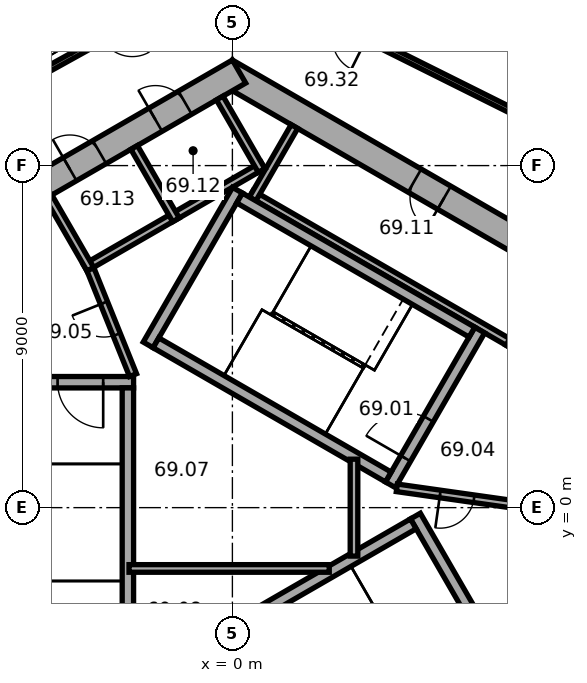
"""IFC4 building model, lengths in metres.
Left out: names, types, materials, properties, quantities, classifications, styles, units other than length and angle.
Written with IfcOpenShell. Run it as: python <this file> out.ifc"""

import sys

from ifc_helpers import new_model, si_unit, direction, frame, frame_2d, origin, place, context, subcontext, project, spatial, rectangle, extrude, element, fill, save


model = new_model("IFC4")
c1 = context("Model", 3, precision=1e-05, world=origin(), true_north=direction((0.0, 1.0)))
c2 = subcontext(c1, "Body", "Model", "MODEL_VIEW")
j1 = project(units=[si_unit("LENGTHUNIT", "METRE"), si_unit("PLANEANGLEUNIT", "RADIAN")], contexts=[c1])
p1 = place(None, origin())
s1 = spatial("IfcSite", under=j1, at=p1, CompositionType="ELEMENT")
p2 = place(p1, origin())
s2 = spatial("IfcBuilding", under=s1, at=p2, CompositionType="ELEMENT")
p3 = place(p2, frame((0.0, 0.0, 278.3)))
s3 = spatial("IfcBuildingStorey", under=s2, at=p3, CompositionType="ELEMENT", Elevation=278.3)
p4 = place(p3, frame((10.025, 5.586, 0.0), z_axis=(0.0, 0.0, 1.0), x_axis=(-0.866026453023, 0.499998182661, 0.0)))
e1 = element("IfcWall", 1, at=p4, inside=s3, PredefinedType="SHEAR", context=c2, shape_type="SweptSolid", body=[
    extrude(rectangle(XDim=11.778, YDim=0.7, at=frame_2d((5.889, 0.0))), origin(), (0.0, 0.0, 1.0), 7.4),
])
p5 = place(p4, frame((5.139, 0.0, 0.0)))
e2 = element("IfcOpeningElement", 2, at=p5, cuts=e1, PredefinedType="OPENING", context=c2, shape_type="SweptSolid", body=[
    extrude(rectangle(XDim=0.9, YDim=2.1, at=frame_2d((0.45, 1.05))), frame((0.0, 0.36, 0.0), z_axis=(0.0, -1.0, 0.0), x_axis=(1.0, 0.0, 0.0)), (0.0, 0.0, 1.0), 0.72),
])
p6 = place(p3, frame((0.175, 11.475, 0.0), z_axis=(0.0, 0.0, 1.0), x_axis=(-0.866026453023, -0.499998182661, 0.0)))
e3 = element("IfcWall", 3, at=p6, inside=s3, PredefinedType="SHEAR", context=c2, shape_type="SweptSolid", body=[
    extrude(rectangle(XDim=11.778, YDim=0.7, at=frame_2d((5.889, 0.0))), origin(), (0.0, 0.0, 1.0), 7.4),
])
p7 = place(p6, frame((6.089, 0.0, 0.0)))
e4 = element("IfcOpeningElement", 4, at=p7, cuts=e3, PredefinedType="OPENING", context=c2, shape_type="SweptSolid", body=[
    extrude(rectangle(XDim=1.5, YDim=2.1, at=frame_2d((0.75, 1.05))), frame((0.0, 0.36, 0.0), z_axis=(0.0, -1.0, 0.0), x_axis=(1.0, 0.0, 0.0)), (0.0, 0.0, 1.0), 0.72),
])
p8 = place(p6, frame((1.639, 0.0, 0.0)))
e5 = element("IfcOpeningElement", 5, at=p8, cuts=e3, PredefinedType="OPENING", context=c2, shape_type="SweptSolid", body=[
    extrude(rectangle(XDim=0.9, YDim=2.1, at=frame_2d((0.45, 1.05))), frame((0.0, 0.36, 0.0), z_axis=(0.0, -1.0, 0.0), x_axis=(1.0, 0.0, 0.0)), (0.0, 0.0, 1.0), 0.72),
])
p9 = place(p6, frame((4.239, 0.0, 0.0)))
e6 = element("IfcOpeningElement", 6, at=p9, cuts=e3, PredefinedType="OPENING", context=c2, shape_type="SweptSolid", body=[
    extrude(rectangle(XDim=0.9, YDim=2.1, at=frame_2d((0.45, 1.05))), frame((0.0, 0.36, 0.0), z_axis=(0.0, -1.0, 0.0), x_axis=(1.0, 0.0, 0.0)), (0.0, 0.0, 1.0), 0.72),
])
p10 = place(p3, frame((-13.117, 6.958, 0.0), z_axis=(0.0, 0.0, 1.0), x_axis=(0.874660896688, 0.484735304889, 0.0)))
e7 = element("IfcWall", 7, at=p10, inside=s3, PredefinedType="STANDARD", context=c2, shape_type="SweptSolid", body=[
    extrude(rectangle(XDim=14.781, YDim=0.15, at=frame_2d((7.39, 0.0))), origin(), (0.0, 0.0, 1.0), 2.6),
])
p11 = place(p10, frame((2.795, 0.0, 0.0)))
e8 = element("IfcOpeningElement", 8, at=p11, cuts=e7, PredefinedType="OPENING", context=c2, shape_type="SweptSolid", body=[
    extrude(rectangle(XDim=1.8, YDim=2.4, at=frame_2d((0.9, 1.2))), frame((0.0, 0.085, 0.0), z_axis=(0.0, -1.0, 0.0), x_axis=(1.0, 0.0, 0.0)), (0.0, 0.0, 1.0), 0.17),
])
p12 = place(p10, frame((10.186, 0.0, 0.0)))
e9 = element("IfcOpeningElement", 9, at=p12, cuts=e7, PredefinedType="OPENING", context=c2, shape_type="SweptSolid", body=[
    extrude(rectangle(XDim=1.8, YDim=2.4, at=frame_2d((0.9, 1.2))), frame((0.0, 0.085, 0.0), z_axis=(0.0, -1.0, 0.0), x_axis=(1.0, 0.0, 0.0)), (0.0, 0.0, 1.0), 0.17),
])
p13 = place(p3, frame((-0.149, 14.181, 0.0), z_axis=(0.0, 0.0, 1.0), x_axis=(0.894939310063, -0.446187887894, 0.0)))
e10 = element("IfcWall", 10, at=p13, inside=s3, PredefinedType="STANDARD", context=c2, shape_type="SweptSolid", body=[
    extrude(rectangle(XDim=12.857, YDim=0.15, at=frame_2d((6.428, 0.0))), origin(), (0.0, 0.0, 1.0), 2.6),
])
p14 = place(p13, frame((2.314, 0.0, 0.0)))
e11 = element("IfcOpeningElement", 11, at=p14, cuts=e10, PredefinedType="OPENING", context=c2, shape_type="SweptSolid", body=[
    extrude(rectangle(XDim=1.8, YDim=2.4, at=frame_2d((0.9, 1.2))), frame((0.0, 0.085, 0.0), z_axis=(0.0, -1.0, 0.0), x_axis=(1.0, 0.0, 0.0)), (0.0, 0.0, 1.0), 0.17),
])
p15 = place(p13, frame((8.743, 0.0, 0.0)))
e12 = element("IfcOpeningElement", 12, at=p15, cuts=e10, PredefinedType="OPENING", context=c2, shape_type="SweptSolid", body=[
    extrude(rectangle(XDim=1.8, YDim=2.4, at=frame_2d((0.9, 1.2))), frame((0.0, 0.085, 0.0), z_axis=(0.0, -1.0, 0.0), x_axis=(1.0, 0.0, 0.0)), (0.0, 0.0, 1.0), 0.17),
])
p16 = place(p3, frame((7.424, 4.259, 0.0), z_axis=(0.0, 0.0, 1.0), x_axis=(-0.866026010844, 0.49999894854, 0.0)))
e13 = element("IfcWall", 13, at=p16, inside=s3, PredefinedType="PARTITIONING", context=c2, shape_type="SweptSolid", body=[
    extrude(rectangle(XDim=8.0, YDim=0.2, at=frame_2d((4.0, 0.0))), origin(), (0.0, 0.0, 1.0), 7.12),
])
for number, where, z_axis, x_axis in (
    (14, (7.287, 4.222, 0.0), (0.0, 0.0, 1.0), (0.5, 0.866, 0.0)),
    (15, (0.532, 8.122, 0.0), (0.0, 0.0, 1.0), (0.5, 0.866, 0.0)),
):
    element("IfcWall", number, at=place(p3, frame(where, z_axis=z_axis, x_axis=x_axis)), inside=s3, PredefinedType="PARTITIONING", context=c2, shape_type="SweptSolid", body=[
        extrude(rectangle(XDim=2.2, YDim=0.2, at=frame_2d((1.1, 0.0))), origin(), (0.0, 0.0, 1.0), 7.12),
    ])
p17 = place(p3, frame((0.803, 9.009, 0.0), z_axis=(0.0, 0.0, 1.0), x_axis=(-0.866028230842, -0.499995103361, 0.0)))
e16 = element("IfcWall", 16, at=p17, inside=s3, PredefinedType="PARTITIONING", context=c2, shape_type="SweptSolid", body=[
    extrude(rectangle(XDim=5.4, YDim=0.2, at=frame_2d((2.7, 0.0))), origin(), (0.0, 0.0, 1.0), 7.12),
])
p18 = place(p3, frame((0.767, 8.872, 0.0), z_axis=(0.0, 0.0, 1.0), x_axis=(-0.499994660107, 0.866028486751, 0.0)))
e17 = element("IfcWall", 17, at=p18, inside=s3, PredefinedType="PARTITIONING", context=c2, shape_type="SweptSolid", body=[
    extrude(rectangle(XDim=2.2, YDim=0.2, at=frame_2d((1.1, 0.0))), origin(), (0.0, 0.0, 1.0), 7.12),
])
for number, where, z_axis, x_axis in (
    (18, (-1.485, 7.572, 0.0), (0.0, 0.0, 1.0), (-0.5, 0.866, 0.0)),
    (19, (-3.737, 6.272, 0.0), (0.0, 0.0, 1.0), (-0.5, 0.866, 0.0)),
):
    element("IfcWall", number, at=place(p3, frame(where, z_axis=z_axis, x_axis=x_axis)), inside=s3, PredefinedType="PARTITIONING", context=c2, shape_type="SweptSolid", body=[
        extrude(rectangle(XDim=2.2, YDim=0.2, at=frame_2d((1.1, 0.0))), origin(), (0.0, 0.0, 1.0), 7.12),
    ])
p19 = place(p3, frame((4.158, 0.602, 0.0), z_axis=(0.0, 0.0, 1.0), x_axis=(0.499977259774, 0.866038532462, 0.0)))
e20 = element("IfcWall", 20, at=p19, inside=s3, PredefinedType="SHEAR", context=c2, shape_type="SweptSolid", body=[
    extrude(rectangle(XDim=4.7, YDim=0.3, at=frame_2d((2.35, 0.0))), origin(), (0.0, 0.0, 1.0), 7.12),
])
p20 = place(p19, frame((0.8, 0.0, 0.0)))
e21 = element("IfcOpeningElement", 21, at=p20, cuts=e20, PredefinedType="OPENING", context=c2, shape_type="SweptSolid", body=[
    extrude(rectangle(XDim=1.2, YDim=2.1, at=frame_2d((0.6, 1.05))), frame((0.0, 0.16, 0.0), z_axis=(0.0, -1.0, 0.0), x_axis=(1.0, 0.0, 0.0)), (0.0, 0.0, 1.0), 0.32),
])
p21 = place(p3, frame((-2.216, 4.282, 0.0), z_axis=(0.0, 0.0, 1.0), x_axis=(0.499977259774, 0.866038532462, 0.0)))
e22 = element("IfcWall", 22, at=p21, inside=s3, PredefinedType="SHEAR", context=c2, shape_type="SweptSolid", body=[
    extrude(rectangle(XDim=4.7, YDim=0.3, at=frame_2d((2.35, 0.0))), origin(), (0.0, 0.0, 1.0), 7.12),
])
for number, where, z_axis, x_axis in (
    (23, (4.103, 0.807, 0.0), (0.0, 0.0, 1.0), (-0.866, 0.5, 0.0)),
    (24, (6.303, 4.617, 0.0), (0.0, 0.0, 1.0), (-0.866, 0.5, 0.0)),
):
    element("IfcWall", number, at=place(p3, frame(where, z_axis=z_axis, x_axis=x_axis)), inside=s3, PredefinedType="SHEAR", context=c2, shape_type="SweptSolid", body=[
        extrude(rectangle(XDim=7.06, YDim=0.3, at=frame_2d((3.53, 0.0))), origin(), (0.0, 0.0, 1.0), 7.12),
    ])
p22 = place(p3, frame((-2.6, 3.3, 0.0), z_axis=(0.0, 0.0, 1.0), x_axis=(-1.0, 0.0, 0.0)))
e25 = element("IfcWall", 25, at=p22, inside=s3, PredefinedType="SHEAR", context=c2, shape_type="SweptSolid", body=[
    extrude(rectangle(XDim=4.7, YDim=0.3, at=frame_2d((2.35, 0.0))), origin(), (0.0, 0.0, 1.0), 7.12),
])
p23 = place(p22, frame((0.8, 0.0, 0.0)))
e26 = element("IfcOpeningElement", 26, at=p23, cuts=e25, PredefinedType="OPENING", context=c2, shape_type="SweptSolid", body=[
    extrude(rectangle(XDim=1.2, YDim=2.1, at=frame_2d((0.6, 1.05))), frame((0.0, 0.16, 0.0), z_axis=(0.0, -1.0, 0.0), x_axis=(1.0, 0.0, 0.0)), (0.0, 0.0, 1.0), 0.32),
])
p24 = place(p3, frame((-2.75, 3.15, 0.0), z_axis=(0.0, 0.0, 1.0), x_axis=(0.0, -1.0, 0.0)))
e27 = element("IfcWall", 27, at=p24, inside=s3, PredefinedType="SHEAR", context=c2, shape_type="SweptSolid", body=[
    extrude(rectangle(XDim=7.06, YDim=0.3, at=frame_2d((3.53, 0.0))), origin(), (0.0, 0.0, 1.0), 7.12),
])
p25 = place(p3, frame((4.816, -0.222, 0.0), z_axis=(0.0, 0.0, 1.0), x_axis=(0.499977259774, -0.866038532462, 0.0)))
e28 = element("IfcWall", 28, at=p25, inside=s3, PredefinedType="SHEAR", context=c2, shape_type="SweptSolid", body=[
    extrude(rectangle(XDim=4.7, YDim=0.3, at=frame_2d((2.35, 0.0))), origin(), (0.0, 0.0, 1.0), 7.12),
])
p26 = place(p3, frame((-1.353, -3.957, 0.0), z_axis=(0.0, 0.0, 1.0), x_axis=(0.866027801685, 0.499995846692, 0.0)))
e29 = element("IfcWall", 29, at=p26, inside=s3, PredefinedType="SHEAR", context=c2, shape_type="SweptSolid", body=[
    extrude(rectangle(XDim=7.06, YDim=0.3, at=frame_2d((3.53, 0.0))), origin(), (0.0, 0.0, 1.0), 7.12),
])
p27 = place(p3, frame((4.327, 0.521, 0.0), z_axis=(0.0, 0.0, 1.0), x_axis=(0.990124376366, -0.14019172346, 0.0)))
e30 = element("IfcWall", 30, at=p27, inside=s3, PredefinedType="PARTITIONING", context=c2, shape_type="SweptSolid", body=[
    extrude(rectangle(XDim=3.002, YDim=0.2, at=frame_2d((1.501, 0.0))), origin(), (0.0, 0.0, 1.0), 7.12),
])
p28 = place(p27, frame((1.15, 0.0, 0.0)))
e31 = element("IfcOpeningElement", 31, at=p28, cuts=e30, PredefinedType="OPENING", context=c2, shape_type="SweptSolid", body=[
    extrude(rectangle(XDim=0.9, YDim=2.1, at=frame_2d((0.45, 1.05))), frame((0.0, 0.11, 0.0), z_axis=(0.0, -1.0, 0.0), x_axis=(1.0, 0.0, 0.0)), (0.0, 0.0, 1.0), 0.22),
])
p29 = place(p3, frame((-2.615, 3.487, 0.0), z_axis=(0.0, 0.0, 1.0), x_axis=(-0.373576831041, 0.92759924068, 0.0)))
e32 = element("IfcWall", 32, at=p29, inside=s3, PredefinedType="PARTITIONING", context=c2, shape_type="SweptSolid", body=[
    extrude(rectangle(XDim=3.002, YDim=0.2, at=frame_2d((1.501, 0.0))), origin(), (0.0, 0.0, 1.0), 7.12),
])
p30 = place(p29, frame((1.15, 0.0, 0.0)))
e33 = element("IfcOpeningElement", 33, at=p30, cuts=e32, PredefinedType="OPENING", context=c2, shape_type="SweptSolid", body=[
    extrude(rectangle(XDim=0.9, YDim=2.1, at=frame_2d((0.45, 1.05))), frame((0.0, 0.11, 0.0), z_axis=(0.0, -1.0, 0.0), x_axis=(1.0, 0.0, 0.0)), (0.0, 0.0, 1.0), 0.22),
])
p31 = place(p3, frame((-2.72, -1.6, 0.0), z_axis=(0.0, 0.0, 1.0), x_axis=(1.0, 0.0, 0.0)))
e34 = element("IfcWall", 34, at=p31, inside=s3, PredefinedType="PARTITIONING", context=c2, shape_type="SweptSolid", body=[
    extrude(rectangle(XDim=5.269, YDim=0.2, at=frame_2d((2.634, 0.0))), origin(), (0.0, 0.0, 1.0), 7.12),
])
p32 = place(p3, frame((3.2, -1.275, 0.0), z_axis=(0.0, 0.0, 1.0), x_axis=(0.0, 1.0, 0.0)))
e35 = element("IfcWall", 35, at=p32, inside=s3, PredefinedType="PARTITIONING", context=c2, shape_type="SweptSolid", body=[
    extrude(rectangle(XDim=2.549, YDim=0.2, at=frame_2d((1.275, 0.0))), origin(), (0.0, 0.0, 1.0), 7.12),
])
p33 = place(p12, origin())
e36 = element("IfcDoor", 36, at=p33, inside=s3, OperationType="DOUBLE_DOOR_DOUBLE_SWING", PredefinedType="DOOR", context=c2, shape_type="SweptSolid", body=[
    extrude(rectangle(XDim=1.8, YDim=2.4, at=frame_2d((0.9, 1.2))), frame((0.0, 0.025, 0.0), z_axis=(0.0, -1.0, 0.0), x_axis=(1.0, 0.0, 0.0)), (0.0, 0.0, 1.0), 0.05),
])
fill(e9, e36)
p34 = place(p20, origin())
e37 = element("IfcDoor", 37, at=p34, inside=s3, OperationType="SINGLE_SWING_RIGHT", PredefinedType="DOOR", context=c2, shape_type="SweptSolid", body=[
    extrude(rectangle(XDim=1.2, YDim=2.1, at=frame_2d((0.6, 1.05))), frame((0.0, 0.025, 0.0), z_axis=(0.0, -1.0, 0.0), x_axis=(1.0, 0.0, 0.0)), (0.0, 0.0, 1.0), 0.05),
])
fill(e21, e37)
p35 = place(p23, origin())
e38 = element("IfcDoor", 38, at=p35, inside=s3, OperationType="SINGLE_SWING_RIGHT", PredefinedType="DOOR", context=c2, shape_type="SweptSolid", body=[
    extrude(rectangle(XDim=1.2, YDim=2.1, at=frame_2d((0.6, 1.05))), frame((0.0, 0.025, 0.0), z_axis=(0.0, -1.0, 0.0), x_axis=(1.0, 0.0, 0.0)), (0.0, 0.0, 1.0), 0.05),
])
fill(e26, e38)
p36 = place(p28, origin())
e39 = element("IfcDoor", 39, at=p36, inside=s3, OperationType="SINGLE_SWING_LEFT", PredefinedType="DOOR", context=c2, shape_type="SweptSolid", body=[
    extrude(rectangle(XDim=0.9, YDim=2.1, at=frame_2d((0.45, 1.05))), frame((0.0, 0.025, 0.0), z_axis=(0.0, -1.0, 0.0), x_axis=(1.0, 0.0, 0.0)), (0.0, 0.0, 1.0), 0.05),
])
fill(e31, e39)
p37 = place(p30, origin())
e40 = element("IfcDoor", 40, at=p37, inside=s3, OperationType="SINGLE_SWING_LEFT", PredefinedType="DOOR", context=c2, shape_type="SweptSolid", body=[
    extrude(rectangle(XDim=0.9, YDim=2.1, at=frame_2d((0.45, 1.05))), frame((0.0, 0.025, 0.0), z_axis=(0.0, -1.0, 0.0), x_axis=(1.0, 0.0, 0.0)), (0.0, 0.0, 1.0), 0.05),
])
fill(e33, e40)
p38 = place(p5, origin())
e41 = element("IfcDoor", 41, at=p38, inside=s3, OperationType="SINGLE_SWING_LEFT", PredefinedType="DOOR", context=c2, shape_type="SweptSolid", body=[
    extrude(rectangle(XDim=0.9, YDim=2.1, at=frame_2d((0.45, 1.05))), frame((0.0, 0.025, 0.0), z_axis=(0.0, -1.0, 0.0), x_axis=(1.0, 0.0, 0.0)), (0.0, 0.0, 1.0), 0.05),
])
fill(e2, e41)
p39 = place(p8, origin())
e42 = element("IfcDoor", 42, at=p39, inside=s3, OperationType="SINGLE_SWING_LEFT", PredefinedType="DOOR", context=c2, shape_type="SweptSolid", body=[
    extrude(rectangle(XDim=0.9, YDim=2.1, at=frame_2d((0.45, 1.05))), frame((0.0, 0.025, 0.0), z_axis=(0.0, -1.0, 0.0), x_axis=(1.0, 0.0, 0.0)), (0.0, 0.0, 1.0), 0.05),
])
fill(e5, e42)
p40 = place(p9, origin())
e43 = element("IfcDoor", 43, at=p40, inside=s3, OperationType="SINGLE_SWING_LEFT", PredefinedType="DOOR", context=c2, shape_type="SweptSolid", body=[
    extrude(rectangle(XDim=0.9, YDim=2.1, at=frame_2d((0.45, 1.05))), frame((0.0, 0.025, 0.0), z_axis=(0.0, -1.0, 0.0), x_axis=(1.0, 0.0, 0.0)), (0.0, 0.0, 1.0), 0.05),
])
fill(e6, e43)
save(model, sys.argv[1])
